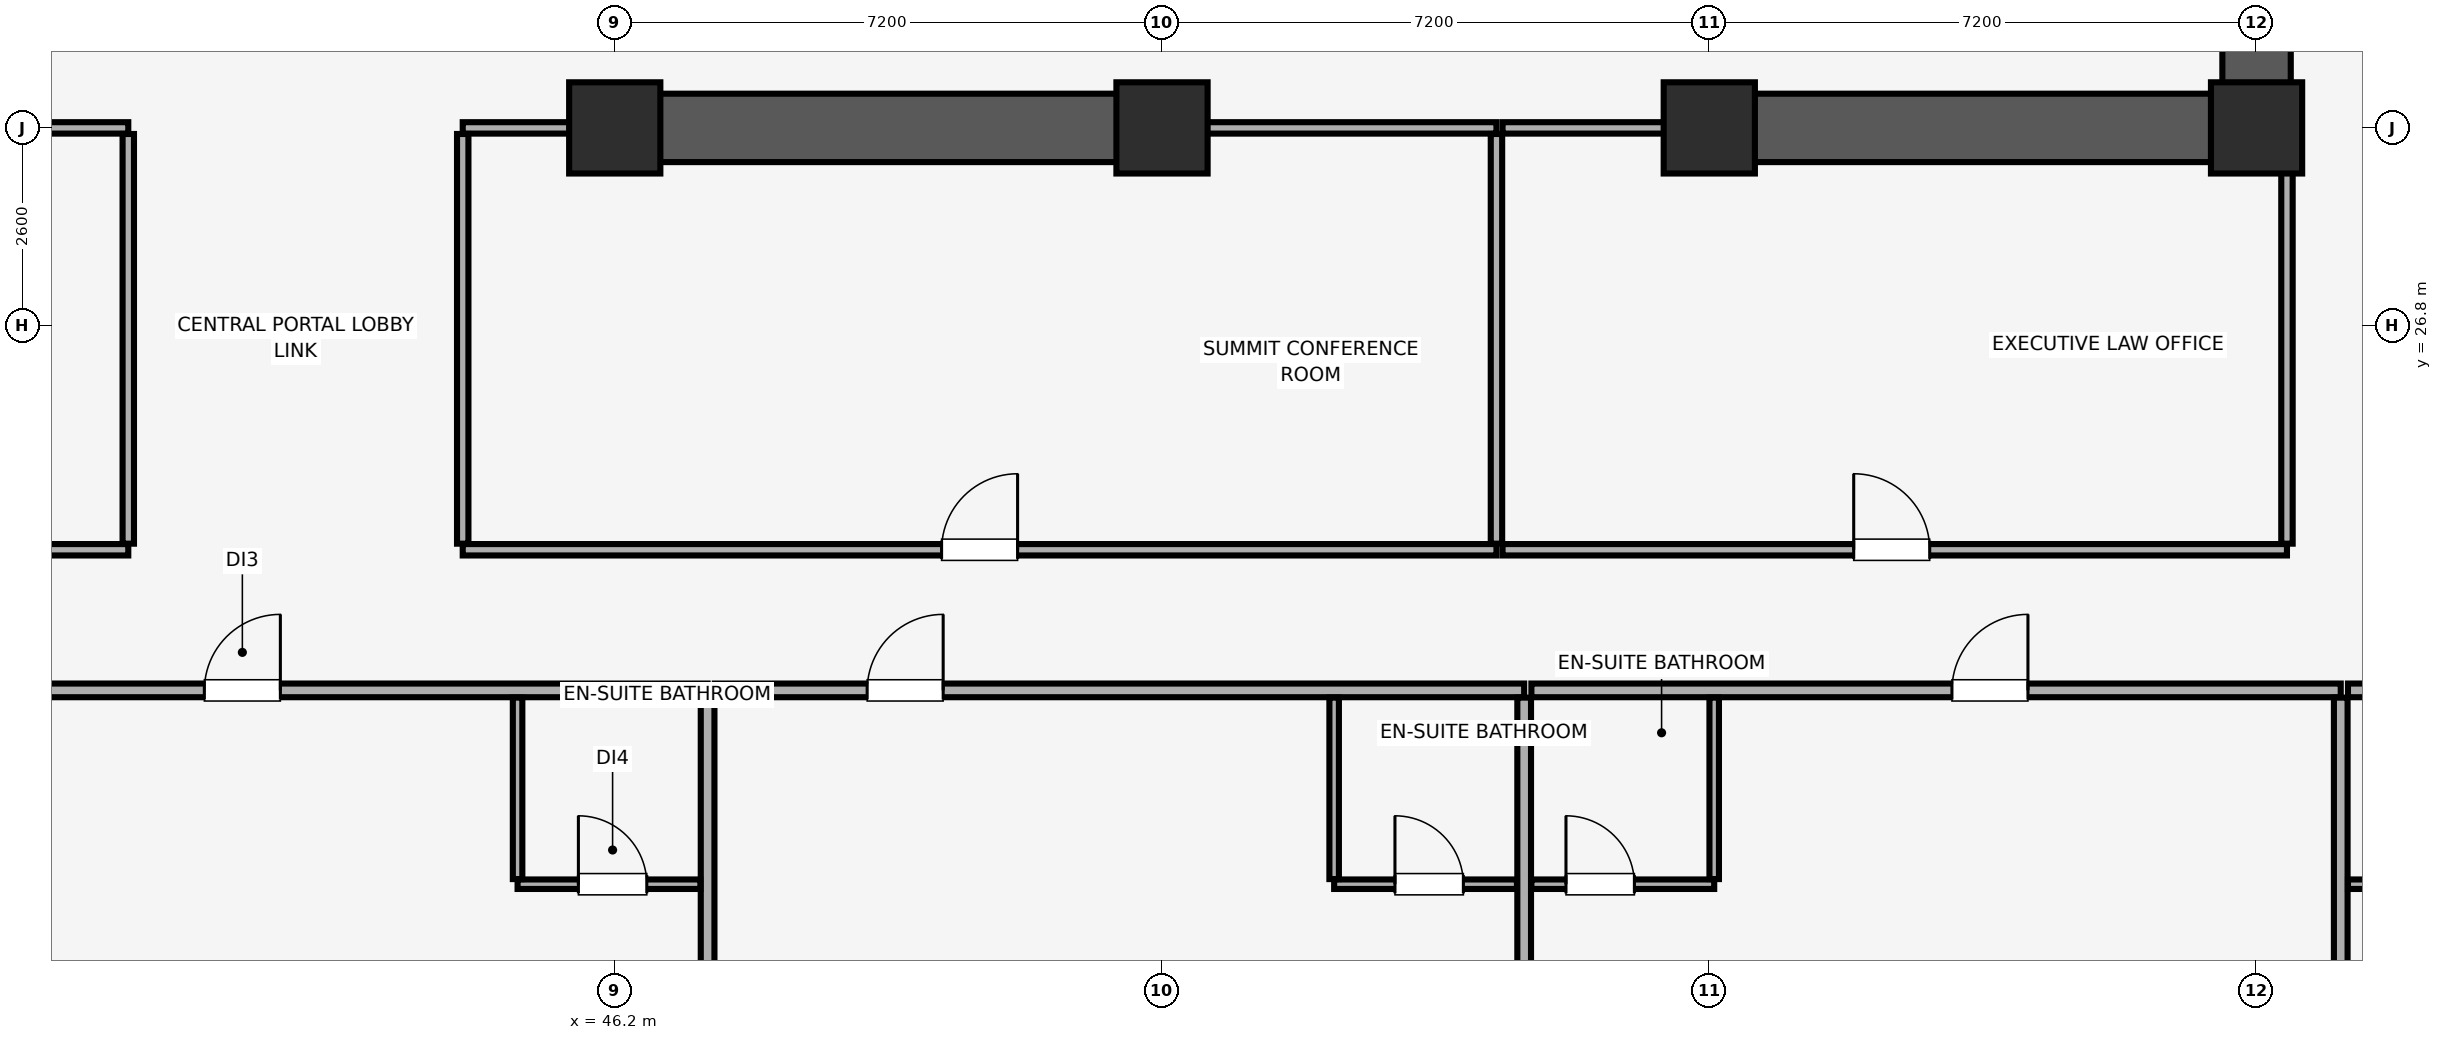
"""IFC4 building model, lengths in metres.
Left out: names, types, materials, properties, quantities, classifications, styles, units other than length and angle.
Written with IfcOpenShell. Run it as: python <this file> out.ifc"""

import sys

from ifc_helpers import new_model, si_unit, direction, frame, frame_2d, origin, origin_2d, place, context, subcontext, project, spatial, rectangle, extrude, element, fill, save


model = new_model("IFC4")
c1 = context("Model", 3, precision=1e-05, world=origin(), true_north=direction((0.0, 1.0)))
c2 = subcontext(c1, "Body", "Model", "MODEL_VIEW")
j1 = project(units=[si_unit("LENGTHUNIT", "METRE"), si_unit("PLANEANGLEUNIT", "RADIAN")], contexts=[c1])
p1 = place(None, origin())
s1 = spatial("IfcSite", under=j1, at=p1, CompositionType="ELEMENT")
p2 = place(p1, origin())
s2 = spatial("IfcBuilding", under=s1, at=p2, CompositionType="ELEMENT")
p3 = place(p2, frame((0.0, 0.0, 104.3)))
s3 = spatial("IfcBuildingStorey", under=s2, at=p3, CompositionType="ELEMENT", Elevation=104.3)
for number, where, z_axis, x_axis in (
    (1, (46.2, 29.4, 0.0), (0.0, 0.0, 1.0), (1.0, 0.0, 0.0)),
    (2, (53.4, 29.4, 0.0), (0.0, 0.0, 1.0), (1.0, 0.0, 0.0)),
    (3, (60.6, 29.4, 0.0), (0.0, 0.0, 1.0), (1.0, 0.0, 0.0)),
    (4, (67.8, 29.4, 0.0), (0.0, 0.0, 1.0), (1.0, 0.0, 0.0)),
):
    element("IfcColumn", number, at=place(p3, frame(where, z_axis=z_axis, x_axis=x_axis)), inside=s3, PredefinedType="COLUMN", context=c2, shape_type="SweptSolid", body=[
        extrude(rectangle(XDim=1.2, YDim=1.2, at=origin_2d()), origin(), (0.0, 0.0, 1.0), 3.51),
    ])
p4 = place(p3, frame((67.8, 29.4, 0.0), z_axis=(0.0, 0.0, 1.0), x_axis=(0.0, 1.0, 0.0)))
e5 = element("IfcWall", 5, at=p4, inside=s3, PredefinedType="SHEAR", context=c2, shape_type="SweptSolid", body=[
    extrude(rectangle(XDim=19.2, YDim=0.9, at=frame_2d((9.6, 0.0))), origin(), (0.0, 0.0, 1.0), 3.51),
])
p5 = place(p3, frame((46.0, 29.4, 0.0), z_axis=(0.0, 0.0, 1.0), x_axis=(1.0, 0.0, 0.0)))
e6 = element("IfcWall", 6, at=p5, inside=s3, PredefinedType="SHEAR", context=c2, shape_type="SweptSolid", body=[
    extrude(rectangle(XDim=7.6, YDim=0.9, at=frame_2d((3.8, 0.0))), origin(), (0.0, 0.0, 1.0), 3.51),
])
p6 = place(p3, frame((60.4, 29.4, 0.0), z_axis=(0.0, 0.0, 1.0), x_axis=(1.0, 0.0, 0.0)))
e7 = element("IfcWall", 7, at=p6, inside=s3, PredefinedType="SHEAR", context=c2, shape_type="SweptSolid", body=[
    extrude(rectangle(XDim=6.945, YDim=0.9, at=frame_2d((3.473, 0.0))), origin(), (0.0, 0.0, 1.0), 3.51),
])
p7 = place(p3, frame((36.774, 22.0, 0.0), z_axis=(0.0, 0.0, 1.0), x_axis=(1.0, 0.0, 0.0)))
e8 = element("IfcWall", 8, at=p7, inside=s3, PredefinedType="PARTITIONING", context=c2, shape_type="SweptSolid", body=[
    extrude(rectangle(XDim=10.648, YDim=0.18, at=frame_2d((5.324, 0.0))), origin(), (0.0, 0.0, 1.0), 3.51),
])
p8 = place(p7, frame((4.027, 0.0, 0.0)))
e9 = element("IfcOpeningElement", 9, at=p8, cuts=e8, PredefinedType="OPENING", context=c2, shape_type="SweptSolid", body=[
    extrude(rectangle(XDim=1.0, YDim=2.15, at=frame_2d((0.5, 1.075))), frame((0.0, 0.1, 0.0), z_axis=(0.0, -1.0, 0.0), x_axis=(1.0, 0.0, 0.0)), (0.0, 0.0, 1.0), 0.2),
])
p9 = place(p3, frame((47.422, 0.15, 0.0), z_axis=(0.0, 0.0, 1.0), x_axis=(0.0, 1.0, 0.0)))
e10 = element("IfcWall", 10, at=p9, inside=s3, PredefinedType="PARTITIONING", context=c2, shape_type="SweptSolid", body=[
    extrude(rectangle(XDim=21.755, YDim=0.18, at=frame_2d((10.877, 0.0))), origin(), (0.0, 0.0, 1.0), 3.51),
])
p10 = place(p3, frame((44.922, 19.45, 0.0), z_axis=(0.0, 0.0, 1.0), x_axis=(1.0, 0.0, 0.0)))
e11 = element("IfcWall", 11, at=p10, inside=s3, PredefinedType="PARTITIONING", context=c2, shape_type="SweptSolid", body=[
    extrude(rectangle(XDim=2.405, YDim=0.125, at=frame_2d((1.203, 0.0))), origin(), (0.0, 0.0, 1.0), 3.51),
])
p11 = place(p10, frame((0.8, 0.0, 0.0)))
e12 = element("IfcOpeningElement", 12, at=p11, cuts=e11, PredefinedType="OPENING", context=c2, shape_type="SweptSolid", body=[
    extrude(rectangle(XDim=0.9, YDim=2.1, at=frame_2d((0.45, 1.05))), frame((0.0, 0.073, 0.0), z_axis=(0.0, -1.0, 0.0), x_axis=(1.0, 0.0, 0.0)), (0.0, 0.0, 1.0), 0.145),
])
p12 = place(p3, frame((44.922, 19.518, 0.0), z_axis=(0.0, 0.0, 1.0), x_axis=(0.0, 1.0, 0.0)))
e13 = element("IfcWall", 13, at=p12, inside=s3, PredefinedType="PARTITIONING", context=c2, shape_type="SweptSolid", body=[
    extrude(rectangle(XDim=2.387, YDim=0.125, at=frame_2d((1.194, 0.0))), origin(), (0.0, 0.0, 1.0), 3.51),
])
p13 = place(p3, frame((47.517, 22.0, 0.0), z_axis=(0.0, 0.0, 1.0), x_axis=(1.0, 0.0, 0.0)))
e14 = element("IfcWall", 14, at=p13, inside=s3, PredefinedType="PARTITIONING", context=c2, shape_type="SweptSolid", body=[
    extrude(rectangle(XDim=10.648, YDim=0.18, at=frame_2d((5.324, 0.0))), origin(), (0.0, 0.0, 1.0), 3.51),
])
p14 = place(p13, frame((2.004, 0.0, 0.0)))
e15 = element("IfcOpeningElement", 15, at=p14, cuts=e14, PredefinedType="OPENING", context=c2, shape_type="SweptSolid", body=[
    extrude(rectangle(XDim=1.0, YDim=2.15, at=frame_2d((0.5, 1.075))), frame((0.0, 0.1, 0.0), z_axis=(0.0, -1.0, 0.0), x_axis=(1.0, 0.0, 0.0)), (0.0, 0.0, 1.0), 0.2),
])
p15 = place(p3, frame((58.165, 0.15, 0.0), z_axis=(0.0, 0.0, 1.0), x_axis=(0.0, 1.0, 0.0)))
e16 = element("IfcWall", 16, at=p15, inside=s3, PredefinedType="PARTITIONING", context=c2, shape_type="SweptSolid", body=[
    extrude(rectangle(XDim=21.755, YDim=0.18, at=frame_2d((10.877, 0.0))), origin(), (0.0, 0.0, 1.0), 3.51),
])
p16 = place(p3, frame((55.665, 19.45, 0.0), z_axis=(0.0, 0.0, 1.0), x_axis=(1.0, 0.0, 0.0)))
e17 = element("IfcWall", 17, at=p16, inside=s3, PredefinedType="PARTITIONING", context=c2, shape_type="SweptSolid", body=[
    extrude(rectangle(XDim=2.405, YDim=0.125, at=frame_2d((1.203, 0.0))), origin(), (0.0, 0.0, 1.0), 3.51),
])
p17 = place(p16, frame((0.8, 0.0, 0.0)))
e18 = element("IfcOpeningElement", 18, at=p17, cuts=e17, PredefinedType="OPENING", context=c2, shape_type="SweptSolid", body=[
    extrude(rectangle(XDim=0.9, YDim=2.1, at=frame_2d((0.45, 1.05))), frame((0.0, 0.073, 0.0), z_axis=(0.0, -1.0, 0.0), x_axis=(1.0, 0.0, 0.0)), (0.0, 0.0, 1.0), 0.145),
])
p18 = place(p3, frame((55.665, 19.518, 0.0), z_axis=(0.0, 0.0, 1.0), x_axis=(0.0, 1.0, 0.0)))
e19 = element("IfcWall", 19, at=p18, inside=s3, PredefinedType="PARTITIONING", context=c2, shape_type="SweptSolid", body=[
    extrude(rectangle(XDim=2.387, YDim=0.125, at=frame_2d((1.194, 0.0))), origin(), (0.0, 0.0, 1.0), 3.51),
])
p19 = place(p3, frame((58.26, 22.0, 0.0), z_axis=(0.0, 0.0, 1.0), x_axis=(1.0, 0.0, 0.0)))
e20 = element("IfcWall", 20, at=p19, inside=s3, PredefinedType="PARTITIONING", context=c2, shape_type="SweptSolid", body=[
    extrude(rectangle(XDim=10.648, YDim=0.18, at=frame_2d((5.324, 0.0))), origin(), (0.0, 0.0, 1.0), 3.51),
])
p20 = place(p19, frame((5.533, 0.0, 0.0)))
e21 = element("IfcOpeningElement", 21, at=p20, cuts=e20, PredefinedType="OPENING", context=c2, shape_type="SweptSolid", body=[
    extrude(rectangle(XDim=1.0, YDim=2.15, at=frame_2d((0.5, 1.075))), frame((0.0, 0.1, 0.0), z_axis=(0.0, -1.0, 0.0), x_axis=(1.0, 0.0, 0.0)), (0.0, 0.0, 1.0), 0.2),
])
p21 = place(p3, frame((68.907, 0.15, 0.0), z_axis=(0.0, 0.0, 1.0), x_axis=(0.0, 1.0, 0.0)))
e22 = element("IfcWall", 22, at=p21, inside=s3, PredefinedType="PARTITIONING", context=c2, shape_type="SweptSolid", body=[
    extrude(rectangle(XDim=21.755, YDim=0.18, at=frame_2d((10.877, 0.0))), origin(), (0.0, 0.0, 1.0), 3.51),
])
p22 = place(p3, frame((58.26, 19.45, 0.0), z_axis=(0.0, 0.0, 1.0), x_axis=(1.0, 0.0, 0.0)))
e23 = element("IfcWall", 23, at=p22, inside=s3, PredefinedType="PARTITIONING", context=c2, shape_type="SweptSolid", body=[
    extrude(rectangle(XDim=2.405, YDim=0.125, at=frame_2d((1.203, 0.0))), origin(), (0.0, 0.0, 1.0), 3.51),
])
p23 = place(p22, frame((0.455, 0.0, 0.0)))
e24 = element("IfcOpeningElement", 24, at=p23, cuts=e23, PredefinedType="OPENING", context=c2, shape_type="SweptSolid", body=[
    extrude(rectangle(XDim=0.9, YDim=2.1, at=frame_2d((0.45, 1.05))), frame((0.0, 0.073, 0.0), z_axis=(0.0, -1.0, 0.0), x_axis=(1.0, 0.0, 0.0)), (0.0, 0.0, 1.0), 0.145),
])
p24 = place(p3, frame((60.665, 19.518, 0.0), z_axis=(0.0, 0.0, 1.0), x_axis=(0.0, 1.0, 0.0)))
e25 = element("IfcWall", 25, at=p24, inside=s3, PredefinedType="PARTITIONING", context=c2, shape_type="SweptSolid", body=[
    extrude(rectangle(XDim=2.387, YDim=0.125, at=frame_2d((1.194, 0.0))), origin(), (0.0, 0.0, 1.0), 2.977),
])
p25 = place(p3, frame((69.002, 22.0, 0.0), z_axis=(0.0, 0.0, 1.0), x_axis=(1.0, 0.0, 0.0)))
e26 = element("IfcWall", 26, at=p25, inside=s3, PredefinedType="PARTITIONING", context=c2, shape_type="SweptSolid", body=[
    extrude(rectangle(XDim=14.848, YDim=0.18, at=frame_2d((7.424, 0.0))), origin(), (0.0, 0.0, 1.0), 3.51),
])
p26 = place(p25, frame((8.163, 0.0, 0.0)))
e27 = element("IfcOpeningElement", 27, at=p26, cuts=e26, PredefinedType="OPENING", context=c2, shape_type="SweptSolid", body=[
    extrude(rectangle(XDim=1.0, YDim=2.15, at=frame_2d((0.5, 1.075))), frame((0.0, 0.1, 0.0), z_axis=(0.0, -1.0, 0.0), x_axis=(1.0, 0.0, 0.0)), (0.0, 0.0, 1.0), 0.2),
])
p27 = place(p3, frame((69.002, 19.45, 0.0), z_axis=(0.0, 0.0, 1.0), x_axis=(1.0, 0.0, 0.0)))
e28 = element("IfcWall", 28, at=p27, inside=s3, PredefinedType="PARTITIONING", context=c2, shape_type="SweptSolid", body=[
    extrude(rectangle(XDim=2.405, YDim=0.125, at=frame_2d((1.203, 0.0))), origin(), (0.0, 0.0, 1.0), 3.51),
])
p28 = place(p27, frame((0.705, 0.0, 0.0)))
e29 = element("IfcOpeningElement", 29, at=p28, cuts=e28, PredefinedType="OPENING", context=c2, shape_type="SweptSolid", body=[
    extrude(rectangle(XDim=0.9, YDim=2.1, at=frame_2d((0.45, 1.05))), frame((0.0, 0.073, 0.0), z_axis=(0.0, -1.0, 0.0), x_axis=(1.0, 0.0, 0.0)), (0.0, 0.0, 1.0), 0.145),
])
p29 = place(p3, frame((29.08, 23.85, 0.0), z_axis=(0.0, 0.0, 1.0), x_axis=(1.0, 0.0, 0.0)))
e30 = element("IfcWall", 30, at=p29, inside=s3, PredefinedType="PARTITIONING", context=c2, shape_type="SweptSolid", body=[
    extrude(rectangle(XDim=10.72, YDim=0.15, at=frame_2d((5.36, 0.0))), origin(), (0.0, 0.0, 1.0), 3.51),
])
p30 = place(p29, frame((4.82, 0.0, 0.0)))
e31 = element("IfcOpeningElement", 31, at=p30, cuts=e30, PredefinedType="OPENING", context=c2, shape_type="SweptSolid", body=[
    extrude(rectangle(XDim=1.0, YDim=2.15, at=frame_2d((0.5, 1.075))), frame((0.0, 0.085, 0.0), z_axis=(0.0, -1.0, 0.0), x_axis=(1.0, 0.0, 0.0)), (0.0, 0.0, 1.0), 0.17),
])
p31 = place(p3, frame((38.01, 29.4, 0.0), z_axis=(0.0, 0.0, 1.0), x_axis=(1.0, 0.0, 0.0)))
e32 = element("IfcWall", 32, at=p31, inside=s3, PredefinedType="PARTITIONING", context=c2, shape_type="SweptSolid", body=[
    extrude(rectangle(XDim=1.79, YDim=0.15, at=frame_2d((0.895, 0.0))), origin(), (0.0, 0.0, 1.0), 2.41),
])
p32 = place(p3, frame((39.8, 23.93, 0.0), z_axis=(0.0, 0.0, 1.0), x_axis=(0.0, 1.0, 0.0)))
e33 = element("IfcWall", 33, at=p32, inside=s3, PredefinedType="PARTITIONING", context=c2, shape_type="SweptSolid", body=[
    extrude(rectangle(XDim=5.39, YDim=0.15, at=frame_2d((2.695, 0.0))), origin(), (0.0, 0.0, 1.0), 3.51),
])
p33 = place(p3, frame((44.2, 23.85, 0.0), z_axis=(0.0, 0.0, 1.0), x_axis=(1.0, 0.0, 0.0)))
e34 = element("IfcWall", 34, at=p33, inside=s3, PredefinedType="PARTITIONING", context=c2, shape_type="SweptSolid", body=[
    extrude(rectangle(XDim=13.6, YDim=0.15, at=frame_2d((6.8, 0.0))), origin(), (0.0, 0.0, 1.0), 3.51),
])
p34 = place(p33, frame((6.3, 0.0, 0.0)))
e35 = element("IfcOpeningElement", 35, at=p34, cuts=e34, PredefinedType="OPENING", context=c2, shape_type="SweptSolid", body=[
    extrude(rectangle(XDim=1.0, YDim=2.15, at=frame_2d((0.5, 1.075))), frame((0.0, 0.085, 0.0), z_axis=(0.0, -1.0, 0.0), x_axis=(1.0, 0.0, 0.0)), (0.0, 0.0, 1.0), 0.17),
])
p35 = place(p3, frame((44.2, 29.4, 0.0), z_axis=(0.0, 0.0, 1.0), x_axis=(1.0, 0.0, 0.0)))
e36 = element("IfcWall", 36, at=p35, inside=s3, PredefinedType="PARTITIONING", context=c2, shape_type="SweptSolid", body=[
    extrude(rectangle(XDim=1.79, YDim=0.15, at=frame_2d((0.895, 0.0))), origin(), (0.0, 0.0, 1.0), 2.41),
])
p36 = place(p3, frame((53.61, 29.4, 0.0), z_axis=(0.0, 0.0, 1.0), x_axis=(1.0, 0.0, 0.0)))
e37 = element("IfcWall", 37, at=p36, inside=s3, PredefinedType="PARTITIONING", context=c2, shape_type="SweptSolid", body=[
    extrude(rectangle(XDim=4.19, YDim=0.15, at=frame_2d((2.095, 0.0))), origin(), (0.0, 0.0, 1.0), 2.41),
])
for number, where, z_axis, x_axis in (
    (38, (44.2, 23.93, 0.0), (0.0, 0.0, 1.0), (0.0, 1.0, 0.0)),
    (39, (57.8, 23.93, 0.0), (0.0, 0.0, 1.0), (0.0, 1.0, 0.0)),
):
    element("IfcWall", number, at=place(p3, frame(where, z_axis=z_axis, x_axis=x_axis)), inside=s3, PredefinedType="PARTITIONING", context=c2, shape_type="SweptSolid", body=[
        extrude(rectangle(XDim=5.39, YDim=0.15, at=frame_2d((2.695, 0.0))), origin(), (0.0, 0.0, 1.0), 3.51),
    ])
p37 = place(p3, frame((57.88, 23.85, 0.0), z_axis=(0.0, 0.0, 1.0), x_axis=(1.0, 0.0, 0.0)))
e40 = element("IfcWall", 40, at=p37, inside=s3, PredefinedType="PARTITIONING", context=c2, shape_type="SweptSolid", body=[
    extrude(rectangle(XDim=10.32, YDim=0.15, at=frame_2d((5.16, 0.0))), origin(), (0.0, 0.0, 1.0), 3.51),
])
p38 = place(p37, frame((4.62, 0.0, 0.0)))
e41 = element("IfcOpeningElement", 41, at=p38, cuts=e40, PredefinedType="OPENING", context=c2, shape_type="SweptSolid", body=[
    extrude(rectangle(XDim=1.0, YDim=2.15, at=frame_2d((0.5, 1.075))), frame((0.0, 0.085, 0.0), z_axis=(0.0, -1.0, 0.0), x_axis=(1.0, 0.0, 0.0)), (0.0, 0.0, 1.0), 0.17),
])
p39 = place(p3, frame((57.88, 29.4, 0.0), z_axis=(0.0, 0.0, 1.0), x_axis=(1.0, 0.0, 0.0)))
e42 = element("IfcWall", 42, at=p39, inside=s3, PredefinedType="PARTITIONING", context=c2, shape_type="SweptSolid", body=[
    extrude(rectangle(XDim=2.51, YDim=0.15, at=frame_2d((1.255, 0.0))), origin(), (0.0, 0.0, 1.0), 2.41),
])
p40 = place(p3, frame((68.2, 23.93, 0.0), z_axis=(0.0, 0.0, 1.0), x_axis=(0.0, 1.0, 0.0)))
e43 = element("IfcWall", 43, at=p40, inside=s3, PredefinedType="PARTITIONING", context=c2, shape_type="SweptSolid", body=[
    extrude(rectangle(XDim=5.46, YDim=0.15, at=frame_2d((2.73, 0.0))), origin(), (0.0, 0.0, 1.0), 3.51),
])
p41 = place(p8, origin())
e44 = element("IfcDoor", 44, at=p41, inside=s3, OperationType="SINGLE_SWING_RIGHT", PredefinedType="DOOR", context=c2, shape_type="SweptSolid", body=[
    extrude(rectangle(XDim=1.0, YDim=2.15, at=frame_2d((0.5, 1.075))), frame((0.0, 0.025, 0.0), z_axis=(0.0, -1.0, 0.0), x_axis=(1.0, 0.0, 0.0)), (0.0, 0.0, 1.0), 0.05),
])
fill(e9, e44)
p42 = place(p11, origin())
e45 = element("IfcDoor", 45, at=p42, inside=s3, OperationType="SINGLE_SWING_LEFT", PredefinedType="DOOR", context=c2, shape_type="SweptSolid", body=[
    extrude(rectangle(XDim=0.9, YDim=2.1, at=frame_2d((0.45, 1.05))), frame((0.0, 0.025, 0.0), z_axis=(0.0, -1.0, 0.0), x_axis=(1.0, 0.0, 0.0)), (0.0, 0.0, 1.0), 0.05),
])
fill(e12, e45)
p43 = place(p14, origin())
e46 = element("IfcDoor", 46, at=p43, inside=s3, OperationType="SINGLE_SWING_RIGHT", PredefinedType="DOOR", context=c2, shape_type="SweptSolid", body=[
    extrude(rectangle(XDim=1.0, YDim=2.15, at=frame_2d((0.5, 1.075))), frame((0.0, 0.025, 0.0), z_axis=(0.0, -1.0, 0.0), x_axis=(1.0, 0.0, 0.0)), (0.0, 0.0, 1.0), 0.05),
])
fill(e15, e46)
p44 = place(p17, origin())
e47 = element("IfcDoor", 47, at=p44, inside=s3, OperationType="SINGLE_SWING_LEFT", PredefinedType="DOOR", context=c2, shape_type="SweptSolid", body=[
    extrude(rectangle(XDim=0.9, YDim=2.1, at=frame_2d((0.45, 1.05))), frame((0.0, 0.025, 0.0), z_axis=(0.0, -1.0, 0.0), x_axis=(1.0, 0.0, 0.0)), (0.0, 0.0, 1.0), 0.05),
])
fill(e18, e47)
p45 = place(p20, origin())
e48 = element("IfcDoor", 48, at=p45, inside=s3, OperationType="SINGLE_SWING_RIGHT", PredefinedType="DOOR", context=c2, shape_type="SweptSolid", body=[
    extrude(rectangle(XDim=1.0, YDim=2.15, at=frame_2d((0.5, 1.075))), frame((0.0, 0.025, 0.0), z_axis=(0.0, -1.0, 0.0), x_axis=(1.0, 0.0, 0.0)), (0.0, 0.0, 1.0), 0.05),
])
fill(e21, e48)
p46 = place(p23, origin())
e49 = element("IfcDoor", 49, at=p46, inside=s3, OperationType="SINGLE_SWING_LEFT", PredefinedType="DOOR", context=c2, shape_type="SweptSolid", body=[
    extrude(rectangle(XDim=0.9, YDim=2.1, at=frame_2d((0.45, 1.05))), frame((0.0, 0.025, 0.0), z_axis=(0.0, -1.0, 0.0), x_axis=(1.0, 0.0, 0.0)), (0.0, 0.0, 1.0), 0.05),
])
fill(e24, e49)
p47 = place(p34, origin())
e50 = element("IfcDoor", 50, at=p47, inside=s3, OperationType="SINGLE_SWING_RIGHT", PredefinedType="DOOR", context=c2, shape_type="SweptSolid", body=[
    extrude(rectangle(XDim=1.0, YDim=2.15, at=frame_2d((0.5, 1.075))), frame((0.0, 0.025, 0.0), z_axis=(0.0, -1.0, 0.0), x_axis=(1.0, 0.0, 0.0)), (0.0, 0.0, 1.0), 0.05),
])
fill(e35, e50)
p48 = place(p38, origin())
e51 = element("IfcDoor", 51, at=p48, inside=s3, OperationType="SINGLE_SWING_LEFT", PredefinedType="DOOR", context=c2, shape_type="SweptSolid", body=[
    extrude(rectangle(XDim=1.0, YDim=2.15, at=frame_2d((0.5, 1.075))), frame((0.0, 0.025, 0.0), z_axis=(0.0, -1.0, 0.0), x_axis=(1.0, 0.0, 0.0)), (0.0, 0.0, 1.0), 0.05),
])
fill(e41, e51)
save(model, sys.argv[1])
